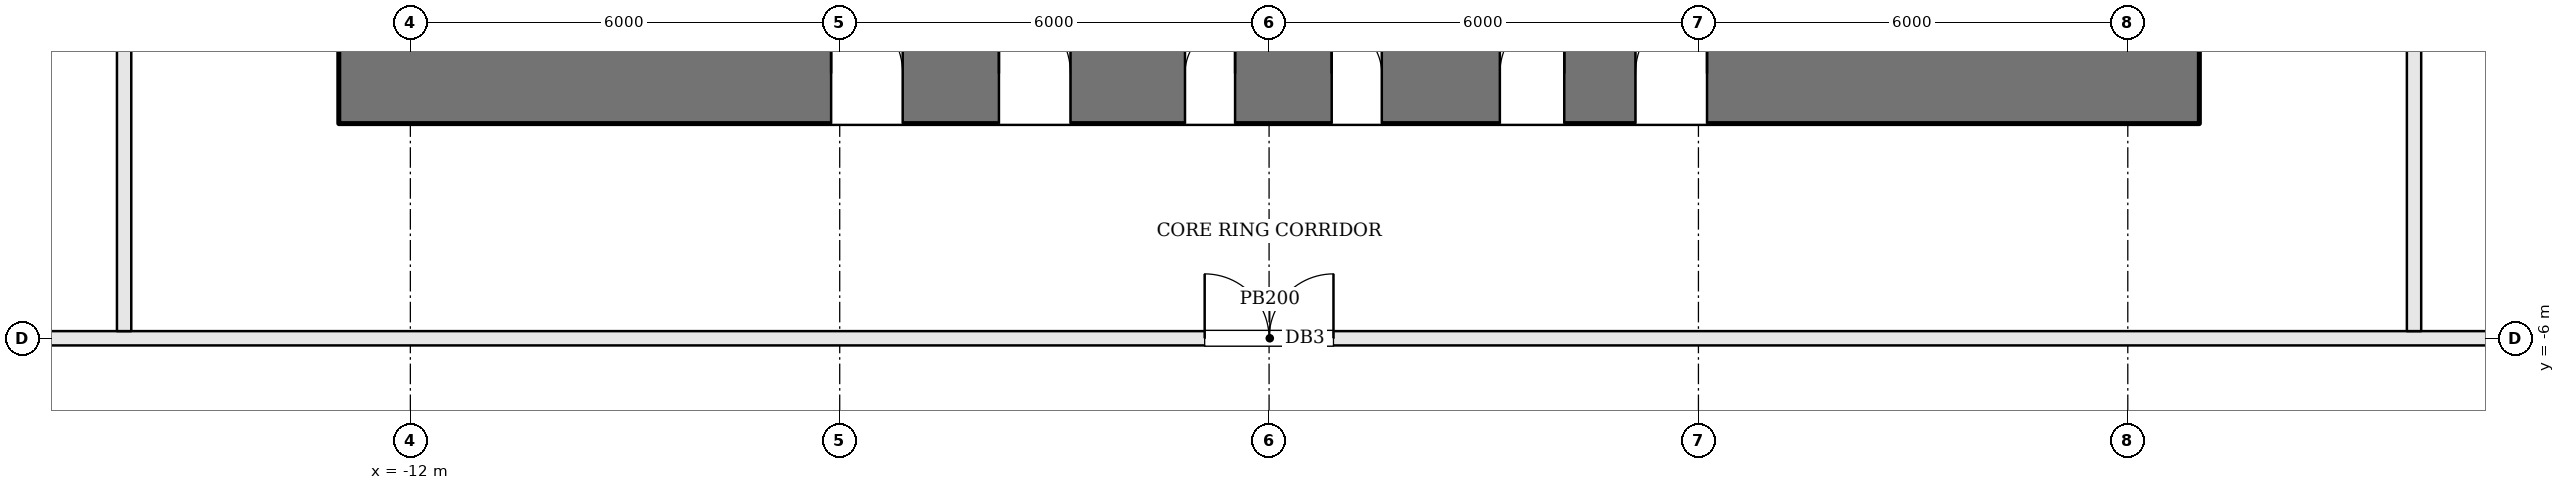
"""IFC4 building model, lengths in metres.
Left out: names, types, materials, properties, quantities, classifications, styles, units other than length and angle.
Written with IfcOpenShell. Run it as: python <this file> out.ifc"""

import sys

from ifc_helpers import new_model, si_unit, direction, frame, frame_2d, origin, place, context, subcontext, project, spatial, rectangle, extrude, element, fill, save


model = new_model("IFC4")
c1 = context("Model", 3, precision=1e-05, world=origin(), true_north=direction((0.0, 1.0)))
c2 = subcontext(c1, "Body", "Model", "MODEL_VIEW")
j1 = project(units=[si_unit("LENGTHUNIT", "METRE"), si_unit("PLANEANGLEUNIT", "RADIAN")], contexts=[c1])
p1 = place(None, origin())
s1 = spatial("IfcSite", under=j1, at=p1, CompositionType="ELEMENT")
p2 = place(p1, origin())
s2 = spatial("IfcBuilding", under=s1, at=p2, CompositionType="ELEMENT")
p3 = place(p2, frame((0.0, 0.0, 55.5)))
s3 = spatial("IfcBuildingStorey", under=s2, at=p3, CompositionType="ELEMENT", Elevation=55.5)
p4 = place(p3, frame((-13.0, -2.3, 0.0), z_axis=(0.0, 0.0, 1.0), x_axis=(1.0, 0.0, 0.0)))
e1 = element("IfcWall", 1, at=p4, inside=s3, PredefinedType="SHEAR", context=c2, shape_type="SweptSolid", body=[
    extrude(rectangle(XDim=26.0, YDim=1.4, at=frame_2d((13.0, 0.0))), origin(), (0.0, 0.0, 1.0), 3.6),
])
p5 = place(p4, frame((9.225, 0.0, 0.0)))
e2 = element("IfcOpeningElement", 2, at=p5, cuts=e1, PredefinedType="OPENING", context=c2, shape_type="SweptSolid", body=[
    extrude(rectangle(XDim=1.0, YDim=2.1, at=frame_2d((0.5, 1.05))), frame((0.0, 0.71, 0.0), z_axis=(0.0, -1.0, 0.0), x_axis=(1.0, 0.0, 0.0)), (0.0, 0.0, 1.0), 1.42),
])
p6 = place(p4, frame((11.825, 0.0, 0.0)))
e3 = element("IfcOpeningElement", 3, at=p6, cuts=e1, PredefinedType="OPENING", context=c2, shape_type="SweptSolid", body=[
    extrude(rectangle(XDim=0.7, YDim=2.1, at=frame_2d((0.35, 1.05))), frame((0.0, 0.71, 0.0), z_axis=(0.0, -1.0, 0.0), x_axis=(1.0, 0.0, 0.0)), (0.0, 0.0, 1.0), 1.42),
])
p7 = place(p4, frame((13.875, 0.0, 0.0)))
e4 = element("IfcOpeningElement", 4, at=p7, cuts=e1, PredefinedType="OPENING", context=c2, shape_type="SweptSolid", body=[
    extrude(rectangle(XDim=0.7, YDim=2.1, at=frame_2d((0.35, 1.05))), frame((0.0, 0.71, 0.0), z_axis=(0.0, -1.0, 0.0), x_axis=(1.0, 0.0, 0.0)), (0.0, 0.0, 1.0), 1.42),
])
p8 = place(p4, frame((16.225, 0.0, 0.0)))
e5 = element("IfcOpeningElement", 5, at=p8, cuts=e1, PredefinedType="OPENING", context=c2, shape_type="SweptSolid", body=[
    extrude(rectangle(XDim=0.9, YDim=2.1, at=frame_2d((0.45, 1.05))), frame((0.0, 0.71, 0.0), z_axis=(0.0, -1.0, 0.0), x_axis=(1.0, 0.0, 0.0)), (0.0, 0.0, 1.0), 1.42),
])
p9 = place(p4, frame((6.88, 0.0, 0.0)))
e6 = element("IfcOpeningElement", 6, at=p9, cuts=e1, PredefinedType="OPENING", context=c2, shape_type="SweptSolid", body=[
    extrude(rectangle(XDim=1.0, YDim=2.1, at=frame_2d((0.5, 1.05))), frame((0.0, 0.71, 0.0), z_axis=(0.0, -1.0, 0.0), x_axis=(1.0, 0.0, 0.0)), (0.0, 0.0, 1.0), 1.42),
])
p10 = place(p4, frame((18.12, 0.0, 0.0)))
e7 = element("IfcOpeningElement", 7, at=p10, cuts=e1, PredefinedType="OPENING", context=c2, shape_type="SweptSolid", body=[
    extrude(rectangle(XDim=1.0, YDim=2.1, at=frame_2d((0.5, 1.05))), frame((0.0, 0.71, 0.0), z_axis=(0.0, -1.0, 0.0), x_axis=(1.0, 0.0, 0.0)), (0.0, 0.0, 1.0), 1.42),
])
p11 = place(p3, frame((-24.018, -6.0, 0.0), z_axis=(0.0, 0.0, 1.0), x_axis=(1.0, 0.0, 0.0)))
e8 = element("IfcWall", 8, at=p11, inside=s3, PredefinedType="PARTITIONING", context=c2, shape_type="SweptSolid", body=[
    extrude(rectangle(XDim=48.056, YDim=0.2, at=frame_2d((24.028, 0.0))), origin(), (0.0, 0.0, 1.0), 3.4),
])
p12 = place(p11, frame((23.118, 0.0, 0.0)))
e9 = element("IfcOpeningElement", 9, at=p12, cuts=e8, PredefinedType="OPENING", context=c2, shape_type="SweptSolid", body=[
    extrude(rectangle(XDim=1.8, YDim=2.1, at=frame_2d((0.9, 1.05))), frame((0.0, 0.11, 0.0), z_axis=(0.0, -1.0, 0.0), x_axis=(1.0, 0.0, 0.0)), (0.0, 0.0, 1.0), 0.22),
])
p13 = place(p3, frame((-16.0, 14.9, 0.0), z_axis=(0.0, 0.0, 1.0), x_axis=(0.0, -1.0, 0.0)))
e10 = element("IfcWall", 10, at=p13, inside=s3, PredefinedType="PARTITIONING", context=c2, shape_type="SweptSolid", body=[
    extrude(rectangle(XDim=20.8, YDim=0.2, at=frame_2d((10.4, 0.0))), origin(), (0.0, 0.0, 1.0), 3.4),
])
p14 = place(p13, frame((9.5, 0.0, 0.0)))
e11 = element("IfcOpeningElement", 11, at=p14, cuts=e10, PredefinedType="OPENING", context=c2, shape_type="SweptSolid", body=[
    extrude(rectangle(XDim=1.8, YDim=2.1, at=frame_2d((0.9, 1.05))), frame((0.0, 0.11, 0.0), z_axis=(0.0, -1.0, 0.0), x_axis=(1.0, 0.0, 0.0)), (0.0, 0.0, 1.0), 0.22),
])
p15 = place(p3, frame((16.0, -5.9, 0.0), z_axis=(0.0, 0.0, 1.0), x_axis=(0.0, 1.0, 0.0)))
e12 = element("IfcWall", 12, at=p15, inside=s3, PredefinedType="PARTITIONING", context=c2, shape_type="SweptSolid", body=[
    extrude(rectangle(XDim=20.8, YDim=0.2, at=frame_2d((10.4, 0.0))), origin(), (0.0, 0.0, 1.0), 3.4),
])
p16 = place(p15, frame((9.5, 0.0, 0.0)))
e13 = element("IfcOpeningElement", 13, at=p16, cuts=e12, PredefinedType="OPENING", context=c2, shape_type="SweptSolid", body=[
    extrude(rectangle(XDim=1.8, YDim=2.1, at=frame_2d((0.9, 1.05))), frame((0.0, 0.11, 0.0), z_axis=(0.0, -1.0, 0.0), x_axis=(1.0, 0.0, 0.0)), (0.0, 0.0, 1.0), 0.22),
])
p17 = place(p5, origin())
e14 = element("IfcDoor", 14, at=p17, inside=s3, OperationType="SINGLE_SWING_LEFT", PredefinedType="DOOR", context=c2, shape_type="SweptSolid", body=[
    extrude(rectangle(XDim=1.0, YDim=2.1, at=frame_2d((0.5, 1.05))), frame((0.0, 0.025, 0.0), z_axis=(0.0, -1.0, 0.0), x_axis=(1.0, 0.0, 0.0)), (0.0, 0.0, 1.0), 0.05),
])
fill(e2, e14)
p18 = place(p6, origin())
e15 = element("IfcDoor", 15, at=p18, inside=s3, OperationType="SINGLE_SWING_RIGHT", PredefinedType="DOOR", context=c2, shape_type="SweptSolid", body=[
    extrude(rectangle(XDim=0.7, YDim=2.1, at=frame_2d((0.35, 1.05))), frame((0.0, 0.025, 0.0), z_axis=(0.0, -1.0, 0.0), x_axis=(1.0, 0.0, 0.0)), (0.0, 0.0, 1.0), 0.05),
])
fill(e3, e15)
p19 = place(p7, origin())
e16 = element("IfcDoor", 16, at=p19, inside=s3, OperationType="SINGLE_SWING_LEFT", PredefinedType="DOOR", context=c2, shape_type="SweptSolid", body=[
    extrude(rectangle(XDim=0.7, YDim=2.1, at=frame_2d((0.35, 1.05))), frame((0.0, 0.025, 0.0), z_axis=(0.0, -1.0, 0.0), x_axis=(1.0, 0.0, 0.0)), (0.0, 0.0, 1.0), 0.05),
])
fill(e4, e16)
p20 = place(p8, origin())
e17 = element("IfcDoor", 17, at=p20, inside=s3, OperationType="SINGLE_SWING_RIGHT", PredefinedType="DOOR", context=c2, shape_type="SweptSolid", body=[
    extrude(rectangle(XDim=0.9, YDim=2.1, at=frame_2d((0.45, 1.05))), frame((0.0, 0.025, 0.0), z_axis=(0.0, -1.0, 0.0), x_axis=(1.0, 0.0, 0.0)), (0.0, 0.0, 1.0), 0.05),
])
fill(e5, e17)
p21 = place(p9, origin())
e18 = element("IfcDoor", 18, at=p21, inside=s3, OperationType="SINGLE_SWING_LEFT", PredefinedType="DOOR", context=c2, shape_type="SweptSolid", body=[
    extrude(rectangle(XDim=1.0, YDim=2.1, at=frame_2d((0.5, 1.05))), frame((0.0, 0.025, 0.0), z_axis=(0.0, -1.0, 0.0), x_axis=(1.0, 0.0, 0.0)), (0.0, 0.0, 1.0), 0.05),
])
fill(e6, e18)
p22 = place(p10, origin())
e19 = element("IfcDoor", 19, at=p22, inside=s3, OperationType="SINGLE_SWING_RIGHT", PredefinedType="DOOR", context=c2, shape_type="SweptSolid", body=[
    extrude(rectangle(XDim=1.0, YDim=2.1, at=frame_2d((0.5, 1.05))), frame((0.0, 0.025, 0.0), z_axis=(0.0, -1.0, 0.0), x_axis=(1.0, 0.0, 0.0)), (0.0, 0.0, 1.0), 0.05),
])
fill(e7, e19)
p23 = place(p12, origin())
e20 = element("IfcDoor", 20, at=p23, inside=s3, OperationType="DOUBLE_DOOR_SINGLE_SWING", PredefinedType="DOOR", context=c2, shape_type="SweptSolid", body=[
    extrude(rectangle(XDim=1.8, YDim=2.1, at=frame_2d((0.9, 1.05))), frame((0.0, 0.025, 0.0), z_axis=(0.0, -1.0, 0.0), x_axis=(1.0, 0.0, 0.0)), (0.0, 0.0, 1.0), 0.05),
])
fill(e9, e20)
save(model, sys.argv[1])
